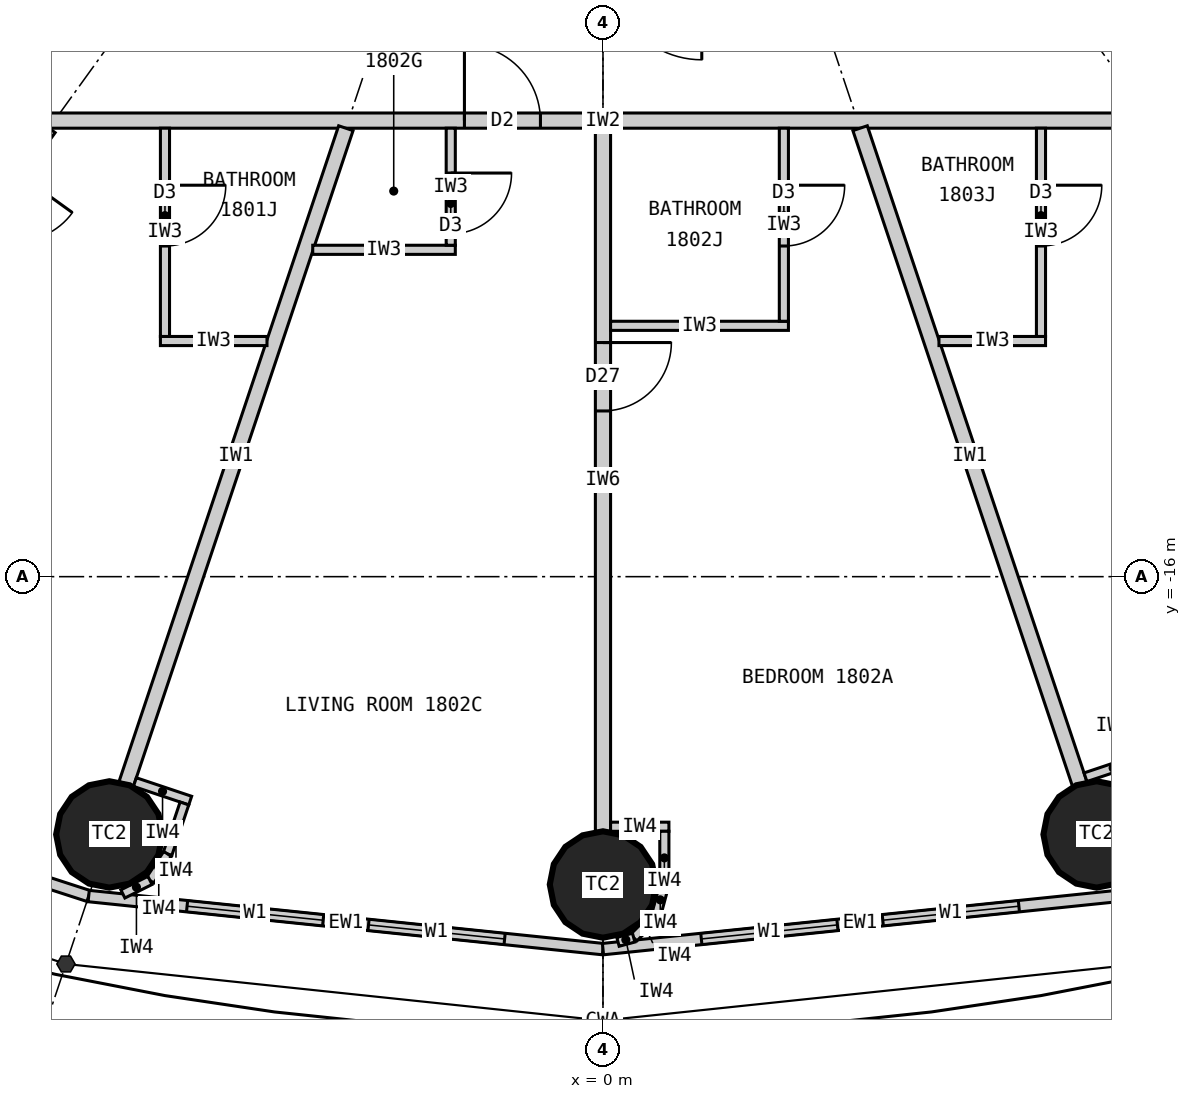
"""IFC4 building model, lengths in metres.
Left out: names, types, materials, properties, quantities, classifications, styles, units other than length and angle.
Written with IfcOpenShell. Run it as: python <this file> out.ifc"""

import sys

from ifc_helpers import new_model, si_unit, direction, frame, frame_2d, origin, origin_2d, place, context, subcontext, project, spatial, rectangle, circle, extrude, element, fill, save


model = new_model("IFC4")
c1 = context("Model", 3, precision=1e-05, world=origin(), true_north=direction((0.0, 1.0)))
c2 = subcontext(c1, "Body", "Model", "MODEL_VIEW")
j1 = project(units=[si_unit("LENGTHUNIT", "METRE"), si_unit("PLANEANGLEUNIT", "RADIAN")], contexts=[c1])
p1 = place(None, origin())
s1 = spatial("IfcSite", under=j1, at=p1, CompositionType="ELEMENT")
p2 = place(p1, origin())
s2 = spatial("IfcBuilding", under=s1, at=p2, CompositionType="ELEMENT")
p3 = place(p2, frame((0.0, 0.0, 73.8)))
s3 = spatial("IfcBuildingStorey", under=s2, at=p3, CompositionType="ELEMENT", Elevation=73.8)
for number, where, z_axis, x_axis in (
    (1, (-6.495, -19.391, 0.0), (0.0, 0.0, 1.0), (1.0, 0.0, 0.0)),
    (2, (0.0, -20.05, 0.0), (0.0, 0.0, 1.0), (1.0, 0.0, 0.0)),
    (3, (6.495, -19.391, 0.0), (0.0, 0.0, 1.0), (1.0, 0.0, 0.0)),
):
    element("IfcColumn", number, at=place(p3, frame(where, z_axis=z_axis, x_axis=x_axis)), inside=s3, PredefinedType="COLUMN", context=c2, shape_type="SweptSolid", body=[
        extrude(circle(Radius=0.7, at=origin_2d()), origin(), (0.0, 0.0, 1.0), 3.3),
    ])
p4 = place(p3, frame((-13.096, -18.147, 0.0), z_axis=(0.0, 0.0, 1.0), x_axis=(0.951137534625, -0.308767534285, 0.0)))
e4 = element("IfcWall", 4, at=p4, inside=s3, PredefinedType="ELEMENTEDWALL", context=c2, shape_type="SweptSolid", body=[
    extrude(rectangle(XDim=6.655, YDim=0.15, at=frame_2d((3.328, 0.0))), origin(), (0.0, 0.0, 1.0), 3.12),
])
p5 = place(p4, frame((1.228, 0.0, 0.9)))
e5 = element("IfcOpeningElement", 5, at=p5, cuts=e4, PredefinedType="OPENING", context=c2, shape_type="SweptSolid", body=[
    extrude(rectangle(XDim=1.8, YDim=1.9, at=frame_2d((0.9, 0.95))), frame((0.0, 0.085, 0.0), z_axis=(0.0, -1.0, 0.0), x_axis=(1.0, 0.0, 0.0)), (0.0, 0.0, 1.0), 0.17),
])
p6 = place(p4, frame((3.628, 0.0, 0.9)))
e6 = element("IfcOpeningElement", 6, at=p6, cuts=e4, PredefinedType="OPENING", context=c2, shape_type="SweptSolid", body=[
    extrude(rectangle(XDim=1.8, YDim=1.9, at=frame_2d((0.9, 0.95))), frame((0.0, 0.085, 0.0), z_axis=(0.0, -1.0, 0.0), x_axis=(1.0, 0.0, 0.0)), (0.0, 0.0, 1.0), 0.17),
])
p7 = place(p3, frame((-6.766, -20.202, 0.0), z_axis=(0.0, 0.0, 1.0), x_axis=(0.994721394369, -0.102612609291, 0.0)))
e7 = element("IfcWall", 7, at=p7, inside=s3, PredefinedType="ELEMENTEDWALL", context=c2, shape_type="SweptSolid", body=[
    extrude(rectangle(XDim=6.802, YDim=0.15, at=frame_2d((3.401, 0.0))), origin(), (0.0, 0.0, 1.0), 3.12),
])
p8 = place(p7, frame((1.301, 0.0, 0.9)))
e8 = element("IfcOpeningElement", 8, at=p8, cuts=e7, PredefinedType="OPENING", context=c2, shape_type="SweptSolid", body=[
    extrude(rectangle(XDim=1.8, YDim=1.9, at=frame_2d((0.9, 0.95))), frame((0.0, 0.085, 0.0), z_axis=(0.0, -1.0, 0.0), x_axis=(1.0, 0.0, 0.0)), (0.0, 0.0, 1.0), 0.17),
])
p9 = place(p7, frame((3.701, 0.0, 0.9)))
e9 = element("IfcOpeningElement", 9, at=p9, cuts=e7, PredefinedType="OPENING", context=c2, shape_type="SweptSolid", body=[
    extrude(rectangle(XDim=1.8, YDim=1.9, at=frame_2d((0.9, 0.95))), frame((0.0, 0.085, 0.0), z_axis=(0.0, -1.0, 0.0), x_axis=(1.0, 0.0, 0.0)), (0.0, 0.0, 1.0), 0.17),
])
p10 = place(p3, frame((0.0, -20.9, 0.0), z_axis=(0.0, 0.0, 1.0), x_axis=(0.994721394369, 0.102612609291, 0.0)))
e10 = element("IfcWall", 10, at=p10, inside=s3, PredefinedType="ELEMENTEDWALL", context=c2, shape_type="SweptSolid", body=[
    extrude(rectangle(XDim=6.802, YDim=0.15, at=frame_2d((3.401, 0.0))), origin(), (0.0, 0.0, 1.0), 3.12),
])
p11 = place(p10, frame((1.301, 0.0, 0.9)))
e11 = element("IfcOpeningElement", 11, at=p11, cuts=e10, PredefinedType="OPENING", context=c2, shape_type="SweptSolid", body=[
    extrude(rectangle(XDim=1.8, YDim=1.9, at=frame_2d((0.9, 0.95))), frame((0.0, 0.085, 0.0), z_axis=(0.0, -1.0, 0.0), x_axis=(1.0, 0.0, 0.0)), (0.0, 0.0, 1.0), 0.17),
])
p12 = place(p10, frame((3.701, 0.0, 0.9)))
e12 = element("IfcOpeningElement", 12, at=p12, cuts=e10, PredefinedType="OPENING", context=c2, shape_type="SweptSolid", body=[
    extrude(rectangle(XDim=1.8, YDim=1.9, at=frame_2d((0.9, 0.95))), frame((0.0, 0.085, 0.0), z_axis=(0.0, -1.0, 0.0), x_axis=(1.0, 0.0, 0.0)), (0.0, 0.0, 1.0), 0.17),
])
p13 = place(p3, frame((14.1, -10.0, 0.0), z_axis=(0.0, 0.0, 1.0), x_axis=(-1.0, 0.0, 0.0)))
e13 = element("IfcWall", 13, at=p13, inside=s3, PredefinedType="PARTITIONING", context=c2, shape_type="SweptSolid", body=[
    extrude(rectangle(XDim=28.2, YDim=0.2, at=frame_2d((14.1, 0.0))), origin(), (0.0, 0.0, 1.0), 3.12),
])
p14 = place(p13, frame((24.165, 0.0, 0.0)))
e14 = element("IfcOpeningElement", 14, at=p14, cuts=e13, PredefinedType="OPENING", context=c2, shape_type="SweptSolid", body=[
    extrude(rectangle(XDim=1.0, YDim=2.2, at=frame_2d((0.5, 1.1))), frame((0.0, 0.11, 0.0), z_axis=(0.0, -1.0, 0.0), x_axis=(1.0, 0.0, 0.0)), (0.0, 0.0, 1.0), 0.22),
])
p15 = place(p13, frame((14.923, 0.0, 0.0)))
e15 = element("IfcOpeningElement", 15, at=p15, cuts=e13, PredefinedType="OPENING", context=c2, shape_type="SweptSolid", body=[
    extrude(rectangle(XDim=1.0, YDim=2.2, at=frame_2d((0.5, 1.1))), frame((0.0, 0.11, 0.0), z_axis=(0.0, -1.0, 0.0), x_axis=(1.0, 0.0, 0.0)), (0.0, 0.0, 1.0), 0.22),
])
p16 = place(p13, frame((3.035, 0.0, 0.0)))
e16 = element("IfcOpeningElement", 16, at=p16, cuts=e13, PredefinedType="OPENING", context=c2, shape_type="SweptSolid", body=[
    extrude(rectangle(XDim=1.0, YDim=2.2, at=frame_2d((0.5, 1.1))), frame((0.0, 0.11, 0.0), z_axis=(0.0, -1.0, 0.0), x_axis=(1.0, 0.0, 0.0)), (0.0, 0.0, 1.0), 0.22),
])
p17 = place(p3, frame((-7.289, -10.1, 0.0), z_axis=(0.0, 0.0, 1.0), x_axis=(-0.585198353053, -0.810890182197, 0.0)))
e17 = element("IfcWall", 17, at=p17, inside=s3, PredefinedType="PARTITIONING", context=c2, shape_type="SweptSolid", body=[
    extrude(rectangle(XDim=8.36, YDim=0.2, at=frame_2d((4.18, 0.0))), origin(), (0.0, 0.0, 1.0), 2.32),
])
p18 = place(p17, frame((0.72, 0.0, 0.0)))
e18 = element("IfcOpeningElement", 18, at=p18, cuts=e17, PredefinedType="OPENING", context=c2, shape_type="SweptSolid", body=[
    extrude(rectangle(XDim=0.9, YDim=2.1, at=frame_2d((0.45, 1.05))), frame((0.0, 0.11, 0.0), z_axis=(0.0, -1.0, 0.0), x_axis=(1.0, 0.0, 0.0)), (0.0, 0.0, 1.0), 0.22),
])
p19 = place(p3, frame((-3.383, -10.1, 0.0), z_axis=(0.0, 0.0, 1.0), x_axis=(-0.31759592231, -0.948226149256, 0.0)))
e19 = element("IfcWall", 19, at=p19, inside=s3, PredefinedType="PARTITIONING", context=c2, shape_type="SweptSolid", body=[
    extrude(rectangle(XDim=9.098, YDim=0.2, at=frame_2d((4.549, 0.0))), origin(), (0.0, 0.0, 1.0), 2.32),
])
p20 = place(p3, frame((0.0, -10.1, 0.0), z_axis=(0.0, 0.0, 1.0), x_axis=(0.0, -1.0, 0.0)))
e20 = element("IfcWall", 20, at=p20, inside=s3, PredefinedType="PARTITIONING", context=c2, shape_type="SweptSolid", body=[
    extrude(rectangle(XDim=9.25, YDim=0.2, at=frame_2d((4.625, 0.0))), origin(), (0.0, 0.0, 1.0), 2.32),
])
p21 = place(p20, frame((2.82, 0.0, 0.0)))
e21 = element("IfcOpeningElement", 21, at=p21, cuts=e20, PredefinedType="OPENING", context=c2, shape_type="SweptSolid", body=[
    extrude(rectangle(XDim=0.9, YDim=2.1, at=frame_2d((0.45, 1.05))), frame((0.0, 0.11, 0.0), z_axis=(0.0, -1.0, 0.0), x_axis=(1.0, 0.0, 0.0)), (0.0, 0.0, 1.0), 0.22),
])
p22 = place(p3, frame((3.383, -10.1, 0.0), z_axis=(0.0, 0.0, 1.0), x_axis=(0.31759592231, -0.948226149256, 0.0)))
e22 = element("IfcWall", 22, at=p22, inside=s3, PredefinedType="PARTITIONING", context=c2, shape_type="SweptSolid", body=[
    extrude(rectangle(XDim=9.098, YDim=0.2, at=frame_2d((4.549, 0.0))), origin(), (0.0, 0.0, 1.0), 2.32),
])
p23 = place(p3, frame((-4.421, -12.9, 0.0), z_axis=(0.0, 0.0, 1.0), x_axis=(-1.0, 0.0, 0.0)))
e23 = element("IfcWall", 23, at=p23, inside=s3, PredefinedType="PARTITIONING", context=c2, shape_type="SweptSolid", body=[
    extrude(rectangle(XDim=1.402, YDim=0.12, at=frame_2d((0.701, 0.0))), origin(), (0.0, 0.0, 1.0), 3.12),
])
p24 = place(p3, frame((-5.763, -10.1, 0.0), z_axis=(0.0, 0.0, 1.0), x_axis=(0.0, -1.0, 0.0)))
e24 = element("IfcWall", 24, at=p24, inside=s3, PredefinedType="PARTITIONING", context=c2, shape_type="SweptSolid", body=[
    extrude(rectangle(XDim=2.74, YDim=0.12, at=frame_2d((1.37, 0.0))), origin(), (0.0, 0.0, 1.0), 3.12),
])
p25 = place(p24, frame((0.75, 0.0, 0.0)))
e25 = element("IfcOpeningElement", 25, at=p25, cuts=e24, PredefinedType="OPENING", context=c2, shape_type="SweptSolid", body=[
    extrude(rectangle(XDim=0.8, YDim=2.1, at=frame_2d((0.4, 1.05))), frame((0.0, 0.07, 0.0), z_axis=(0.0, -1.0, 0.0), x_axis=(1.0, 0.0, 0.0)), (0.0, 0.0, 1.0), 0.14),
])
p26 = place(p3, frame((-3.819, -11.7, 0.0), z_axis=(0.0, 0.0, 1.0), x_axis=(1.0, 0.0, 0.0)))
e26 = element("IfcWall", 26, at=p26, inside=s3, PredefinedType="PARTITIONING", context=c2, shape_type="SweptSolid", body=[
    extrude(rectangle(XDim=1.876, YDim=0.12, at=frame_2d((0.938, 0.0))), origin(), (0.0, 0.0, 1.0), 3.12),
])
p27 = place(p3, frame((-2.003, -10.1, 0.0), z_axis=(0.0, 0.0, 1.0), x_axis=(0.0, -1.0, 0.0)))
e27 = element("IfcWall", 27, at=p27, inside=s3, PredefinedType="PARTITIONING", context=c2, shape_type="SweptSolid", body=[
    extrude(rectangle(XDim=1.54, YDim=0.12, at=frame_2d((0.77, 0.0))), origin(), (0.0, 0.0, 1.0), 3.12),
])
p28 = place(p27, frame((0.59, 0.0, 0.0)))
e28 = element("IfcOpeningElement", 28, at=p28, cuts=e27, PredefinedType="OPENING", context=c2, shape_type="SweptSolid", body=[
    extrude(rectangle(XDim=0.8, YDim=2.1, at=frame_2d((0.4, 1.05))), frame((0.0, 0.07, 0.0), z_axis=(0.0, -1.0, 0.0), x_axis=(1.0, 0.0, 0.0)), (0.0, 0.0, 1.0), 0.14),
])
p29 = place(p3, frame((0.1, -12.7, 0.0), z_axis=(0.0, 0.0, 1.0), x_axis=(1.0, 0.0, 0.0)))
e29 = element("IfcWall", 29, at=p29, inside=s3, PredefinedType="PARTITIONING", context=c2, shape_type="SweptSolid", body=[
    extrude(rectangle(XDim=2.34, YDim=0.12, at=frame_2d((1.17, 0.0))), origin(), (0.0, 0.0, 1.0), 3.12),
])
p30 = place(p3, frame((2.38, -10.1, 0.0), z_axis=(0.0, 0.0, 1.0), x_axis=(0.0, -1.0, 0.0)))
e30 = element("IfcWall", 30, at=p30, inside=s3, PredefinedType="PARTITIONING", context=c2, shape_type="SweptSolid", body=[
    extrude(rectangle(XDim=2.54, YDim=0.12, at=frame_2d((1.27, 0.0))), origin(), (0.0, 0.0, 1.0), 3.12),
])
p31 = place(p30, frame((0.75, 0.0, 0.0)))
e31 = element("IfcOpeningElement", 31, at=p31, cuts=e30, PredefinedType="OPENING", context=c2, shape_type="SweptSolid", body=[
    extrude(rectangle(XDim=0.8, YDim=2.1, at=frame_2d((0.4, 1.05))), frame((0.0, 0.07, 0.0), z_axis=(0.0, -1.0, 0.0), x_axis=(1.0, 0.0, 0.0)), (0.0, 0.0, 1.0), 0.14),
])
p32 = place(p3, frame((4.421, -12.9, 0.0), z_axis=(0.0, 0.0, 1.0), x_axis=(1.0, 0.0, 0.0)))
e32 = element("IfcWall", 32, at=p32, inside=s3, PredefinedType="PARTITIONING", context=c2, shape_type="SweptSolid", body=[
    extrude(rectangle(XDim=1.402, YDim=0.12, at=frame_2d((0.701, 0.0))), origin(), (0.0, 0.0, 1.0), 3.12),
])
p33 = place(p3, frame((5.763, -10.1, 0.0), z_axis=(0.0, 0.0, 1.0), x_axis=(0.0, -1.0, 0.0)))
e33 = element("IfcWall", 33, at=p33, inside=s3, PredefinedType="PARTITIONING", context=c2, shape_type="SweptSolid", body=[
    extrude(rectangle(XDim=2.74, YDim=0.12, at=frame_2d((1.37, 0.0))), origin(), (0.0, 0.0, 1.0), 3.12),
])
p34 = place(p33, frame((0.75, 0.0, 0.0)))
e34 = element("IfcOpeningElement", 34, at=p34, cuts=e33, PredefinedType="OPENING", context=c2, shape_type="SweptSolid", body=[
    extrude(rectangle(XDim=0.8, YDim=2.1, at=frame_2d((0.4, 1.05))), frame((0.0, 0.07, 0.0), z_axis=(0.0, -1.0, 0.0), x_axis=(1.0, 0.0, 0.0)), (0.0, 0.0, 1.0), 0.14),
])
p35 = place(p3, frame((-6.159, -18.702, 0.0), z_axis=(0.0, 0.0, 1.0), x_axis=(0.948173154049, -0.31775410295, 0.0)))
e35 = element("IfcWall", 35, at=p35, inside=s3, PredefinedType="PARTITIONING", context=c2, shape_type="SweptSolid", body=[
    extrude(rectangle(XDim=0.768, YDim=0.12, at=frame_2d((0.384, 0.0))), origin(), (0.0, 0.0, 1.0), 3.12),
])
p36 = place(p3, frame((-5.507, -18.984, 0.0), z_axis=(0.0, 0.0, 1.0), x_axis=(-0.317692050622, -0.948193946918, 0.0)))
e36 = element("IfcWall", 36, at=p36, inside=s3, PredefinedType="PARTITIONING", context=c2, shape_type="SweptSolid", body=[
    extrude(rectangle(XDim=0.7, YDim=0.12, at=frame_2d((0.35, 0.0))), origin(), (0.0, 0.0, 1.0), 3.12),
])
p37 = place(p3, frame((-5.729, -19.648, 0.0), z_axis=(0.0, 0.0, 1.0), x_axis=(-0.552135764955, -0.833754218615, 0.0)))
e37 = element("IfcWall", 37, at=p37, inside=s3, PredefinedType="PARTITIONING", context=c2, shape_type="SweptSolid", body=[
    extrude(rectangle(XDim=0.418, YDim=0.12, at=frame_2d((0.209, 0.0))), origin(), (0.0, 0.0, 1.0), 3.12),
])
p38 = place(p3, frame((-5.96, -19.996, 0.0), z_axis=(0.0, 0.0, 1.0), x_axis=(-0.895160725913, -0.445743507842, 0.0)))
e38 = element("IfcWall", 38, at=p38, inside=s3, PredefinedType="PARTITIONING", context=c2, shape_type="SweptSolid", body=[
    extrude(rectangle(XDim=0.399, YDim=0.12, at=frame_2d((0.199, 0.0))), origin(), (0.0, 0.0, 1.0), 3.12),
])
p39 = place(p3, frame((0.1, -19.29, 0.0), z_axis=(0.0, 0.0, 1.0), x_axis=(1.0, 0.0, 0.0)))
e39 = element("IfcWall", 39, at=p39, inside=s3, PredefinedType="PARTITIONING", context=c2, shape_type="SweptSolid", body=[
    extrude(rectangle(XDim=0.767, YDim=0.12, at=frame_2d((0.384, 0.0))), origin(), (0.0, 0.0, 1.0), 3.12),
])
p40 = place(p3, frame((0.808, -19.35, 0.0), z_axis=(0.0, 0.0, 1.0), x_axis=(0.0, -1.0, 0.0)))
e40 = element("IfcWall", 40, at=p40, inside=s3, PredefinedType="PARTITIONING", context=c2, shape_type="SweptSolid", body=[
    extrude(rectangle(XDim=0.7, YDim=0.12, at=frame_2d((0.35, 0.0))), origin(), (0.0, 0.0, 1.0), 3.12),
])
p41 = place(p3, frame((0.808, -20.05, 0.0), z_axis=(0.0, 0.0, 1.0), x_axis=(-0.2592614205, -0.965807183573, 0.0)))
e41 = element("IfcWall", 41, at=p41, inside=s3, PredefinedType="PARTITIONING", context=c2, shape_type="SweptSolid", body=[
    extrude(rectangle(XDim=0.418, YDim=0.12, at=frame_2d((0.209, 0.0))), origin(), (0.0, 0.0, 1.0), 3.12),
])
p42 = place(p3, frame((0.699, -20.454, 0.0), z_axis=(0.0, 0.0, 1.0), x_axis=(-0.707106781187, -0.707106781187, 0.0)))
e42 = element("IfcWall", 42, at=p42, inside=s3, PredefinedType="PARTITIONING", context=c2, shape_type="SweptSolid", body=[
    extrude(rectangle(XDim=0.418, YDim=0.12, at=frame_2d((0.209, 0.0))), origin(), (0.0, 0.0, 1.0), 3.12),
])
p43 = place(p3, frame((0.404, -20.749, 0.0), z_axis=(0.0, 0.0, 1.0), x_axis=(-0.965759066438, -0.25944060128, 0.0)))
e43 = element("IfcWall", 43, at=p43, inside=s3, PredefinedType="PARTITIONING", context=c2, shape_type="SweptSolid", body=[
    extrude(rectangle(XDim=0.214, YDim=0.12, at=frame_2d((0.107, 0.0))), origin(), (0.0, 0.0, 1.0), 3.12),
])
p44 = place(p3, frame((6.348, -18.639, 0.0), z_axis=(0.0, 0.0, 1.0), x_axis=(0.948268951266, 0.317468102437, 0.0)))
e44 = element("IfcWall", 44, at=p44, inside=s3, PredefinedType="PARTITIONING", context=c2, shape_type="SweptSolid", body=[
    extrude(rectangle(XDim=0.768, YDim=0.12, at=frame_2d((0.384, 0.0))), origin(), (0.0, 0.0, 1.0), 3.12),
])
p45 = place(p8, origin())
e45 = element("IfcWindow", 45, at=p45, inside=s3, PartitioningType="SINGLE_PANEL", PredefinedType="WINDOW", context=c2, shape_type="SweptSolid", body=[
    extrude(rectangle(XDim=1.8, YDim=1.9, at=frame_2d((0.9, 0.95))), frame((0.0, 0.03, 0.0), z_axis=(0.0, -1.0, 0.0), x_axis=(1.0, 0.0, 0.0)), (0.0, 0.0, 1.0), 0.06),
])
fill(e8, e45)
p46 = place(p9, origin())
e46 = element("IfcWindow", 46, at=p46, inside=s3, PartitioningType="SINGLE_PANEL", PredefinedType="WINDOW", context=c2, shape_type="SweptSolid", body=[
    extrude(rectangle(XDim=1.8, YDim=1.9, at=frame_2d((0.9, 0.95))), frame((0.0, 0.03, 0.0), z_axis=(0.0, -1.0, 0.0), x_axis=(1.0, 0.0, 0.0)), (0.0, 0.0, 1.0), 0.06),
])
fill(e9, e46)
p47 = place(p11, origin())
e47 = element("IfcWindow", 47, at=p47, inside=s3, PartitioningType="SINGLE_PANEL", PredefinedType="WINDOW", context=c2, shape_type="SweptSolid", body=[
    extrude(rectangle(XDim=1.8, YDim=1.9, at=frame_2d((0.9, 0.95))), frame((0.0, 0.03, 0.0), z_axis=(0.0, -1.0, 0.0), x_axis=(1.0, 0.0, 0.0)), (0.0, 0.0, 1.0), 0.06),
])
fill(e11, e47)
p48 = place(p12, origin())
e48 = element("IfcWindow", 48, at=p48, inside=s3, PartitioningType="SINGLE_PANEL", PredefinedType="WINDOW", context=c2, shape_type="SweptSolid", body=[
    extrude(rectangle(XDim=1.8, YDim=1.9, at=frame_2d((0.9, 0.95))), frame((0.0, 0.03, 0.0), z_axis=(0.0, -1.0, 0.0), x_axis=(1.0, 0.0, 0.0)), (0.0, 0.0, 1.0), 0.06),
])
fill(e12, e48)
p49 = place(p25, origin())
e49 = element("IfcDoor", 49, at=p49, inside=s3, OperationType="SINGLE_SWING_LEFT", PredefinedType="DOOR", context=c2, shape_type="SweptSolid", body=[
    extrude(rectangle(XDim=0.8, YDim=2.1, at=frame_2d((0.4, 1.05))), frame((0.0, 0.025, 0.0), z_axis=(0.0, -1.0, 0.0), x_axis=(1.0, 0.0, 0.0)), (0.0, 0.0, 1.0), 0.05),
])
fill(e25, e49)
p50 = place(p28, origin())
e50 = element("IfcDoor", 50, at=p50, inside=s3, OperationType="SINGLE_SWING_LEFT", PredefinedType="DOOR", context=c2, shape_type="SweptSolid", body=[
    extrude(rectangle(XDim=0.8, YDim=2.1, at=frame_2d((0.4, 1.05))), frame((0.0, 0.025, 0.0), z_axis=(0.0, -1.0, 0.0), x_axis=(1.0, 0.0, 0.0)), (0.0, 0.0, 1.0), 0.05),
])
fill(e28, e50)
p51 = place(p15, origin())
e51 = element("IfcDoor", 51, at=p51, inside=s3, OperationType="SINGLE_SWING_RIGHT", PredefinedType="DOOR", context=c2, shape_type="SweptSolid", body=[
    extrude(rectangle(XDim=1.0, YDim=2.2, at=frame_2d((0.5, 1.1))), frame((0.0, 0.025, 0.0), z_axis=(0.0, -1.0, 0.0), x_axis=(1.0, 0.0, 0.0)), (0.0, 0.0, 1.0), 0.05),
])
fill(e15, e51)
p52 = place(p31, origin())
e52 = element("IfcDoor", 52, at=p52, inside=s3, OperationType="SINGLE_SWING_LEFT", PredefinedType="DOOR", context=c2, shape_type="SweptSolid", body=[
    extrude(rectangle(XDim=0.8, YDim=2.1, at=frame_2d((0.4, 1.05))), frame((0.0, 0.025, 0.0), z_axis=(0.0, -1.0, 0.0), x_axis=(1.0, 0.0, 0.0)), (0.0, 0.0, 1.0), 0.05),
])
fill(e31, e52)
p53 = place(p21, origin())
e53 = element("IfcDoor", 53, at=p53, inside=s3, OperationType="SINGLE_SWING_LEFT", PredefinedType="DOOR", context=c2, shape_type="SweptSolid", body=[
    extrude(rectangle(XDim=0.9, YDim=2.1, at=frame_2d((0.45, 1.05))), frame((0.0, 0.025, 0.0), z_axis=(0.0, -1.0, 0.0), x_axis=(1.0, 0.0, 0.0)), (0.0, 0.0, 1.0), 0.05),
])
fill(e21, e53)
p54 = place(p34, origin())
e54 = element("IfcDoor", 54, at=p54, inside=s3, OperationType="SINGLE_SWING_LEFT", PredefinedType="DOOR", context=c2, shape_type="SweptSolid", body=[
    extrude(rectangle(XDim=0.8, YDim=2.1, at=frame_2d((0.4, 1.05))), frame((0.0, 0.025, 0.0), z_axis=(0.0, -1.0, 0.0), x_axis=(1.0, 0.0, 0.0)), (0.0, 0.0, 1.0), 0.05),
])
fill(e34, e54)
save(model, sys.argv[1])
